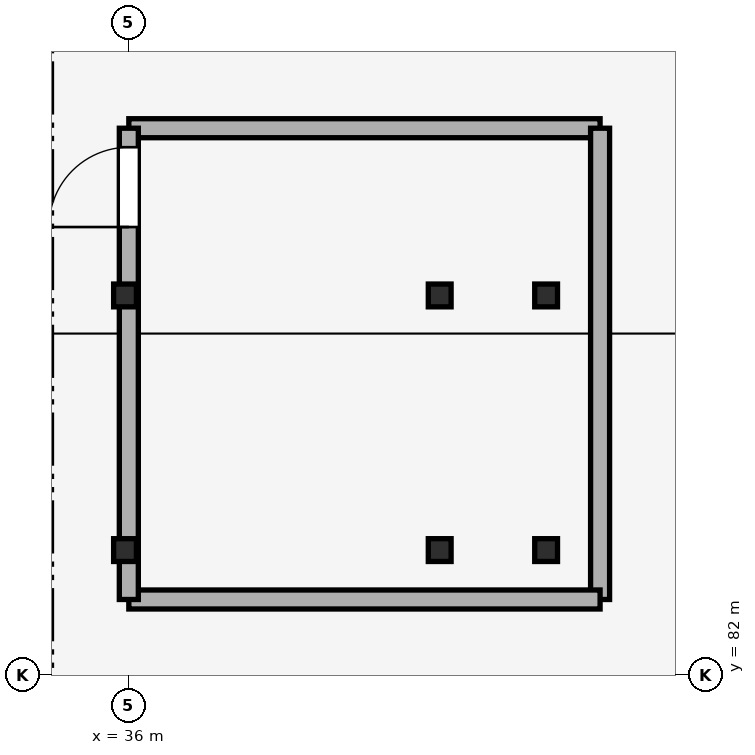
"""IFC4 building model, lengths in metres.
Left out: names, types, materials, properties, quantities, classifications, styles, units other than length and angle.
Written with IfcOpenShell. Run it as: python <this file> out.ifc"""

import sys

from ifc_helpers import new_model, si_unit, direction, frame, frame_2d, origin, origin_2d, place, context, subcontext, project, spatial, rectangle, hollow_rectangle, extrude, element, fill, save


model = new_model("IFC4")
c1 = context("Model", 3, precision=1e-05, world=origin(), true_north=direction((0.0, 1.0)))
c2 = subcontext(c1, "Body", "Model", "MODEL_VIEW")
j1 = project(units=[si_unit("LENGTHUNIT", "METRE"), si_unit("PLANEANGLEUNIT", "RADIAN")], contexts=[c1])
p1 = place(None, origin())
s1 = spatial("IfcSite", under=j1, at=p1, CompositionType="ELEMENT")
p2 = place(p1, origin())
s2 = spatial("IfcBuilding", under=s1, at=p2, CompositionType="ELEMENT")
p3 = place(p2, origin())
s3 = spatial("IfcBuildingStorey", under=s2, at=p3, CompositionType="ELEMENT", Elevation=0.0)
for number, where, z_axis, x_axis in (
    (1, (35.95, 83.65, 0.0), (0.0, 0.0, 1.0), (1.0, 0.0, 0.0)),
    (2, (35.95, 87.0, 0.0), (0.0, 0.0, 1.0), (1.0, 0.0, 0.0)),
    (3, (40.09, 83.65, 0.0), (0.0, 0.0, 1.0), (1.0, 0.0, 0.0)),
    (4, (40.09, 87.0, 0.0), (0.0, 0.0, 1.0), (1.0, 0.0, 0.0)),
    (5, (41.49, 83.65, 0.0), (0.0, 0.0, 1.0), (1.0, 0.0, 0.0)),
    (6, (41.49, 87.0, 0.0), (0.0, 0.0, 1.0), (1.0, 0.0, 0.0)),
):
    element("IfcColumn", number, at=place(p3, frame(where, z_axis=z_axis, x_axis=x_axis)), inside=s3, PredefinedType="COLUMN", context=c2, shape_type="SweptSolid", body=[
        extrude(hollow_rectangle(XDim=0.3, YDim=0.3, WallThickness=0.012, at=origin_2d()), origin(), (0.0, 0.0, 1.0), 5.4),
    ])
for number, where, z_axis, x_axis in (
    (7, (36.0, 89.2, 0.0), (0.0, 0.0, 1.0), (1.0, 0.0, 0.0)),
    (8, (42.2, 89.2, 0.0), (0.0, 0.0, 1.0), (0.0, -1.0, 0.0)),
    (9, (42.2, 83.0, 0.0), (0.0, 0.0, 1.0), (-1.0, 0.0, 0.0)),
):
    element("IfcWall", number, at=place(p3, frame(where, z_axis=z_axis, x_axis=x_axis)), inside=s3, PredefinedType="STANDARD", context=c2, shape_type="SweptSolid", body=[
        extrude(rectangle(XDim=6.2, YDim=0.25, at=frame_2d((3.1, 0.0))), origin(), (0.0, 0.0, 1.0), 5.12),
    ])
p4 = place(p3, frame((36.0, 83.0, 0.0), z_axis=(0.0, 0.0, 1.0), x_axis=(0.0, 1.0, 0.0)))
e10 = element("IfcWall", 10, at=p4, inside=s3, PredefinedType="STANDARD", context=c2, shape_type="SweptSolid", body=[
    extrude(rectangle(XDim=6.2, YDim=0.25, at=frame_2d((3.1, 0.0))), origin(), (0.0, 0.0, 1.0), 5.12),
])
p5 = place(p4, frame((4.9, 0.0, 0.0)))
e11 = element("IfcOpeningElement", 11, at=p5, cuts=e10, PredefinedType="OPENING", context=c2, shape_type="SweptSolid", body=[
    extrude(rectangle(XDim=1.05, YDim=2.15, at=frame_2d((0.525, 1.075))), frame((0.0, 0.135, 0.0), z_axis=(0.0, -1.0, 0.0), x_axis=(1.0, 0.0, 0.0)), (0.0, 0.0, 1.0), 0.27),
])
p6 = place(p5, origin())
e12 = element("IfcDoor", 12, at=p6, inside=s3, OperationType="SINGLE_SWING_LEFT", PredefinedType="DOOR", context=c2, shape_type="SweptSolid", body=[
    extrude(rectangle(XDim=1.05, YDim=2.15, at=frame_2d((0.525, 1.075))), frame((0.0, 0.025, 0.0), z_axis=(0.0, -1.0, 0.0), x_axis=(1.0, 0.0, 0.0)), (0.0, 0.0, 1.0), 0.05),
])
fill(e11, e12)
save(model, sys.argv[1])
